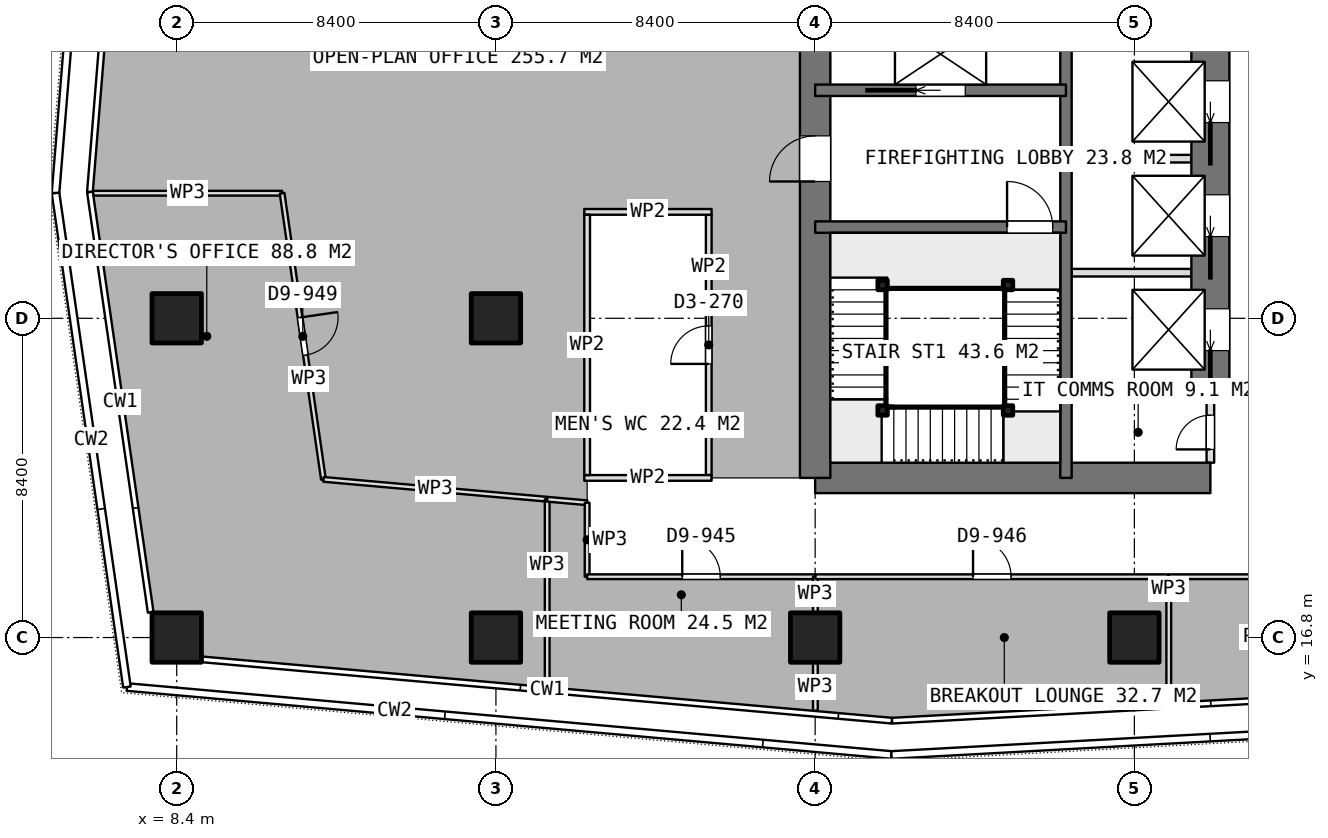
"""IFC4 building model, lengths in metres.
Left out: names, types, materials, properties, quantities, classifications, styles, units other than length and angle.
Written with IfcOpenShell. Run it as: python <this file> out.ifc"""

import sys

from ifc_helpers import new_model, si_unit, direction, frame, frame_2d, origin, origin_2d, place, context, subcontext, project, spatial, rectangle, extrude, element, fill, save


model = new_model("IFC4")
c1 = context("Model", 3, precision=1e-05, world=origin(), true_north=direction((0.0, 1.0)))
c2 = subcontext(c1, "Body", "Model", "MODEL_VIEW")
j1 = project(units=[si_unit("LENGTHUNIT", "METRE"), si_unit("PLANEANGLEUNIT", "RADIAN")], contexts=[c1])
p1 = place(None, origin())
s1 = spatial("IfcSite", under=j1, at=p1, CompositionType="ELEMENT")
p2 = place(p1, origin())
s2 = spatial("IfcBuilding", under=s1, at=p2, CompositionType="ELEMENT")
p3 = place(p2, frame((0.0, 0.0, 253.85)))
s3 = spatial("IfcBuildingStorey", under=s2, at=p3, CompositionType="ELEMENT", Elevation=253.85)
p4 = place(p3, frame((25.2, 21.0, 0.0), z_axis=(0.0, 0.0, 1.0), x_axis=(1.0, 0.0, 0.0)))
e1 = element("IfcWall", 1, at=p4, inside=s3, PredefinedType="SHEAR", context=c2, shape_type="SweptSolid", body=[
    extrude(rectangle(XDim=10.4, YDim=0.8, at=frame_2d((5.2, 0.0))), origin(), (0.0, 0.0, 1.0), 3.75),
])
p5 = place(p3, frame((25.2, 21.0, 0.0), z_axis=(0.0, 0.0, 1.0), x_axis=(0.0, 1.0, 0.0)))
e2 = element("IfcWall", 2, at=p5, inside=s3, PredefinedType="SHEAR", context=c2, shape_type="SweptSolid", body=[
    extrude(rectangle(XDim=25.2, YDim=0.8, at=frame_2d((12.6, 0.0))), origin(), (0.0, 0.0, 1.0), 3.75),
])
p6 = place(p5, frame((7.8, 0.0, 0.0)))
e3 = element("IfcOpeningElement", 3, at=p6, cuts=e2, PredefinedType="OPENING", context=c2, shape_type="SweptSolid", body=[
    extrude(rectangle(XDim=1.2, YDim=2.1, at=frame_2d((0.6, 1.05))), frame((0.0, 0.41, 0.0), z_axis=(0.0, -1.0, 0.0), x_axis=(1.0, 0.0, 0.0)), (0.0, 0.0, 1.0), 0.82),
])
p7 = place(p5, frame((14.25, 0.0, 0.0)))
e4 = element("IfcOpeningElement", 4, at=p7, cuts=e2, PredefinedType="OPENING", context=c2, shape_type="SweptSolid", body=[
    extrude(rectangle(XDim=0.9, YDim=2.1, at=frame_2d((0.45, 1.05))), frame((0.0, 0.41, 0.0), z_axis=(0.0, -1.0, 0.0), x_axis=(1.0, 0.0, 0.0)), (0.0, 0.0, 1.0), 0.82),
])
p8 = place(p5, frame((16.85, 0.0, 0.0)))
e5 = element("IfcOpeningElement", 5, at=p8, cuts=e2, PredefinedType="OPENING", context=c2, shape_type="SweptSolid", body=[
    extrude(rectangle(XDim=0.9, YDim=2.1, at=frame_2d((0.45, 1.05))), frame((0.0, 0.41, 0.0), z_axis=(0.0, -1.0, 0.0), x_axis=(1.0, 0.0, 0.0)), (0.0, 0.0, 1.0), 0.82),
])
p9 = place(p5, frame((18.95, 0.0, 0.0)))
e6 = element("IfcOpeningElement", 6, at=p9, cuts=e2, PredefinedType="OPENING", context=c2, shape_type="SweptSolid", body=[
    extrude(rectangle(XDim=1.2, YDim=2.1, at=frame_2d((0.6, 1.05))), frame((0.0, 0.41, 0.0), z_axis=(0.0, -1.0, 0.0), x_axis=(1.0, 0.0, 0.0)), (0.0, 0.0, 1.0), 0.82),
])
p10 = place(p3, frame((31.8, 21.0, 0.0), z_axis=(0.0, 0.0, 1.0), x_axis=(0.0, 1.0, 0.0)))
e7 = element("IfcWall", 7, at=p10, inside=s3, PredefinedType="SHEAR", context=c2, shape_type="SweptSolid", body=[
    extrude(rectangle(XDim=25.2, YDim=0.3, at=frame_2d((12.6, 0.0))), origin(), (0.0, 0.0, 1.0), 3.75),
])
p11 = place(p3, frame((35.6, 23.4, 0.0), z_axis=(0.0, 0.0, 1.0), x_axis=(0.0, 1.0, 0.0)))
e8 = element("IfcWall", 8, at=p11, inside=s3, PredefinedType="SHEAR", context=c2, shape_type="SweptSolid", body=[
    extrude(rectangle(XDim=18.0, YDim=1.0, at=frame_2d((9.0, 0.0))), origin(), (0.0, 0.0, 1.0), 3.75),
])
p12 = place(p11, frame((0.95, 0.0, 0.0)))
e9 = element("IfcOpeningElement", 9, at=p12, cuts=e8, PredefinedType="OPENING", context=c2, shape_type="SweptSolid", body=[
    extrude(rectangle(XDim=1.1, YDim=2.1, at=frame_2d((0.55, 1.05))), frame((0.0, 0.51, 0.0), z_axis=(0.0, -1.0, 0.0), x_axis=(1.0, 0.0, 0.0)), (0.0, 0.0, 1.0), 1.02),
])
p13 = place(p11, frame((3.95, 0.0, 0.0)))
e10 = element("IfcOpeningElement", 10, at=p13, cuts=e8, PredefinedType="OPENING", context=c2, shape_type="SweptSolid", body=[
    extrude(rectangle(XDim=1.1, YDim=2.1, at=frame_2d((0.55, 1.05))), frame((0.0, 0.51, 0.0), z_axis=(0.0, -1.0, 0.0), x_axis=(1.0, 0.0, 0.0)), (0.0, 0.0, 1.0), 1.02),
])
p14 = place(p11, frame((6.95, 0.0, 0.0)))
e11 = element("IfcOpeningElement", 11, at=p14, cuts=e8, PredefinedType="OPENING", context=c2, shape_type="SweptSolid", body=[
    extrude(rectangle(XDim=1.1, YDim=2.1, at=frame_2d((0.55, 1.05))), frame((0.0, 0.51, 0.0), z_axis=(0.0, -1.0, 0.0), x_axis=(1.0, 0.0, 0.0)), (0.0, 0.0, 1.0), 1.02),
])
p15 = place(p11, frame((9.95, 0.0, 0.0)))
e12 = element("IfcOpeningElement", 12, at=p15, cuts=e8, PredefinedType="OPENING", context=c2, shape_type="SweptSolid", body=[
    extrude(rectangle(XDim=1.1, YDim=2.1, at=frame_2d((0.55, 1.05))), frame((0.0, 0.51, 0.0), z_axis=(0.0, -1.0, 0.0), x_axis=(1.0, 0.0, 0.0)), (0.0, 0.0, 1.0), 1.02),
])
p16 = place(p11, frame((12.95, 0.0, 0.0)))
e13 = element("IfcOpeningElement", 13, at=p16, cuts=e8, PredefinedType="OPENING", context=c2, shape_type="SweptSolid", body=[
    extrude(rectangle(XDim=1.1, YDim=2.1, at=frame_2d((0.55, 1.05))), frame((0.0, 0.51, 0.0), z_axis=(0.0, -1.0, 0.0), x_axis=(1.0, 0.0, 0.0)), (0.0, 0.0, 1.0), 1.02),
])
p17 = place(p11, frame((15.95, 0.0, 0.0)))
e14 = element("IfcOpeningElement", 14, at=p17, cuts=e8, PredefinedType="OPENING", context=c2, shape_type="SweptSolid", body=[
    extrude(rectangle(XDim=1.1, YDim=2.1, at=frame_2d((0.55, 1.05))), frame((0.0, 0.51, 0.0), z_axis=(0.0, -1.0, 0.0), x_axis=(1.0, 0.0, 0.0)), (0.0, 0.0, 1.0), 1.02),
])
p18 = place(p3, frame((31.8, 23.4, 0.0), z_axis=(0.0, 0.0, 1.0), x_axis=(1.0, 0.0, 0.0)))
e15 = element("IfcWall", 15, at=p18, inside=s3, PredefinedType="SHEAR", context=c2, shape_type="SweptSolid", body=[
    extrude(rectangle(XDim=3.8, YDim=0.3, at=frame_2d((1.9, 0.0))), origin(), (0.0, 0.0, 1.0), 3.75),
])
p19 = place(p3, frame((25.2, 27.6, 0.0), z_axis=(0.0, 0.0, 1.0), x_axis=(1.0, 0.0, 0.0)))
e16 = element("IfcWall", 16, at=p19, inside=s3, PredefinedType="SHEAR", context=c2, shape_type="SweptSolid", body=[
    extrude(rectangle(XDim=6.6, YDim=0.3, at=frame_2d((3.3, 0.0))), origin(), (0.0, 0.0, 1.0), 3.75),
])
p20 = place(p19, frame((5.05, 0.0, 0.0)))
e17 = element("IfcOpeningElement", 17, at=p20, cuts=e16, PredefinedType="OPENING", context=c2, shape_type="SweptSolid", body=[
    extrude(rectangle(XDim=1.2, YDim=2.1, at=frame_2d((0.6, 1.05))), frame((0.0, 0.16, 0.0), z_axis=(0.0, -1.0, 0.0), x_axis=(1.0, 0.0, 0.0)), (0.0, 0.0, 1.0), 0.32),
])
p21 = place(p3, frame((25.2, 31.2, 0.0), z_axis=(0.0, 0.0, 1.0), x_axis=(1.0, 0.0, 0.0)))
e18 = element("IfcWall", 18, at=p21, inside=s3, PredefinedType="SHEAR", context=c2, shape_type="SweptSolid", body=[
    extrude(rectangle(XDim=6.6, YDim=0.3, at=frame_2d((3.3, 0.0))), origin(), (0.0, 0.0, 1.0), 3.75),
])
p22 = place(p21, frame((2.65, 0.0, 0.0)))
e19 = element("IfcOpeningElement", 19, at=p22, cuts=e18, PredefinedType="OPENING", context=c2, shape_type="SweptSolid", body=[
    extrude(rectangle(XDim=1.3, YDim=2.1, at=frame_2d((0.65, 1.05))), frame((0.0, 0.16, 0.0), z_axis=(0.0, -1.0, 0.0), x_axis=(1.0, 0.0, 0.0)), (0.0, 0.0, 1.0), 0.32),
])
for number, where, z_axis, x_axis in (
    (20, (8.4, 16.8, 0.0), (0.0, 0.0, 1.0), (1.0, 0.0, 0.0)),
    (21, (8.4, 25.2, 0.0), (0.0, 0.0, 1.0), (1.0, 0.0, 0.0)),
    (22, (16.8, 16.8, 0.0), (0.0, 0.0, 1.0), (1.0, 0.0, 0.0)),
    (23, (16.8, 25.2, 0.0), (0.0, 0.0, 1.0), (1.0, 0.0, 0.0)),
    (24, (25.2, 16.8, 0.0), (0.0, 0.0, 1.0), (1.0, 0.0, 0.0)),
    (25, (33.6, 16.8, 0.0), (0.0, 0.0, 1.0), (1.0, 0.0, 0.0)),
):
    element("IfcColumn", number, at=place(p3, frame(where, z_axis=z_axis, x_axis=x_axis)), inside=s3, PredefinedType="COLUMN", context=c2, shape_type="SweptSolid", body=[
        extrude(rectangle(XDim=1.3, YDim=1.3, at=origin_2d()), origin(), (0.0, 0.0, 1.0), 3.75),
    ])
for number, where, z_axis, x_axis in (
    (26, (31.95, 26.4, 0.0), (0.0, 0.0, 1.0), (1.0, 0.0, 0.0)),
    (27, (31.95, 29.4, 0.0), (0.0, 0.0, 1.0), (1.0, 0.0, 0.0)),
):
    element("IfcWall", number, at=place(p3, frame(where, z_axis=z_axis, x_axis=x_axis)), inside=s3, PredefinedType="PARTITIONING", context=c2, shape_type="SweptSolid", body=[
        extrude(rectangle(XDim=3.15, YDim=0.2, at=frame_2d((1.575, 0.0))), origin(), (0.0, 0.0, 1.0), 3.5),
    ])
p23 = place(p3, frame((35.6, 21.4, 0.0), z_axis=(0.0, 0.0, 1.0), x_axis=(0.0, 1.0, 0.0)))
e28 = element("IfcWall", 28, at=p23, inside=s3, PredefinedType="PARTITIONING", context=c2, shape_type="SweptSolid", body=[
    extrude(rectangle(XDim=1.85, YDim=0.2, at=frame_2d((0.925, 0.0))), origin(), (0.0, 0.0, 1.0), 3.5),
])
p24 = place(p23, frame((0.35, 0.0, 0.0)))
e29 = element("IfcOpeningElement", 29, at=p24, cuts=e28, PredefinedType="OPENING", context=c2, shape_type="SweptSolid", body=[
    extrude(rectangle(XDim=0.9, YDim=2.1, at=frame_2d((0.45, 1.05))), frame((0.0, 0.11, 0.0), z_axis=(0.0, -1.0, 0.0), x_axis=(1.0, 0.0, 0.0)), (0.0, 0.0, 1.0), 0.22),
])
for number, where, z_axis, x_axis in (
    (30, (19.125, 21.0, 0.0), (0.0, 0.0, 1.0), (1.0, 0.0, 0.0)),
    (31, (19.125, 28.0, 0.0), (0.0, 0.0, 1.0), (1.0, 0.0, 0.0)),
):
    element("IfcWall", number, at=place(p3, frame(where, z_axis=z_axis, x_axis=x_axis)), inside=s3, PredefinedType="PARTITIONING", context=c2, shape_type="SweptSolid", body=[
        extrude(rectangle(XDim=3.35, YDim=0.15, at=frame_2d((1.675, 0.0))), origin(), (0.0, 0.0, 1.0), 3.5),
    ])
p25 = place(p3, frame((19.2, 21.075, 0.0), z_axis=(0.0, 0.0, 1.0), x_axis=(0.0, 1.0, 0.0)))
e32 = element("IfcWall", 32, at=p25, inside=s3, PredefinedType="PARTITIONING", context=c2, shape_type="SweptSolid", body=[
    extrude(rectangle(XDim=6.85, YDim=0.15, at=frame_2d((3.425, 0.0))), origin(), (0.0, 0.0, 1.0), 3.5),
])
p26 = place(p3, frame((22.4, 21.075, 0.0), z_axis=(0.0, 0.0, 1.0), x_axis=(0.0, 1.0, 0.0)))
e33 = element("IfcWall", 33, at=p26, inside=s3, PredefinedType="PARTITIONING", context=c2, shape_type="SweptSolid", body=[
    extrude(rectangle(XDim=6.85, YDim=0.15, at=frame_2d((3.425, 0.0))), origin(), (0.0, 0.0, 1.0), 3.5),
])
p27 = place(p26, frame((2.925, 0.0, 0.0)))
e34 = element("IfcOpeningElement", 34, at=p27, cuts=e33, PredefinedType="OPENING", context=c2, shape_type="SweptSolid", body=[
    extrude(rectangle(XDim=1.0, YDim=2.1, at=frame_2d((0.5, 1.05))), frame((0.0, 0.085, 0.0), z_axis=(0.0, -1.0, 0.0), x_axis=(1.0, 0.0, 0.0)), (0.0, 0.0, 1.0), 0.17),
])
p28 = place(p3, frame((34.505, 15.059, 0.0), z_axis=(0.0, 0.0, 1.0), x_axis=(0.0, 1.0, 0.0)))
e35 = element("IfcWall", 35, at=p28, inside=s3, PredefinedType="PARTITIONING", context=c2, shape_type="SweptSolid", body=[
    extrude(rectangle(XDim=3.341, YDim=0.125, at=frame_2d((1.67, 0.0))), origin(), (0.0, 0.0, 1.0), 3.5),
])
p29 = place(p3, frame((34.505, 18.4, 0.0), z_axis=(0.0, 0.0, 1.0), x_axis=(1.0, 0.0, 0.0)))
e36 = element("IfcWall", 36, at=p29, inside=s3, PredefinedType="PARTITIONING", context=c2, shape_type="SweptSolid", body=[
    extrude(rectangle(XDim=8.168, YDim=0.125, at=frame_2d((4.084, 0.0))), origin(), (0.0, 0.0, 1.0), 3.5),
])
p30 = place(p29, frame((3.584, 0.0, 0.0)))
e37 = element("IfcOpeningElement", 37, at=p30, cuts=e36, PredefinedType="OPENING", context=c2, shape_type="SweptSolid", body=[
    extrude(rectangle(XDim=1.0, YDim=2.1, at=frame_2d((0.5, 1.05))), frame((0.0, 0.073, 0.0), z_axis=(0.0, -1.0, 0.0), x_axis=(1.0, 0.0, 0.0)), (0.0, 0.0, 1.0), 0.145),
])
p31 = place(p3, frame((6.201, 28.491, 0.0), z_axis=(0.0, 0.0, 1.0), x_axis=(1.0, 0.0, 0.0)))
e38 = element("IfcWall", 38, at=p31, inside=s3, PredefinedType="PARTITIONING", context=c2, shape_type="SweptSolid", body=[
    extrude(rectangle(XDim=4.972, YDim=0.125, at=frame_2d((2.486, 0.0))), origin(), (0.0, 0.0, 1.0), 3.5),
])
p32 = place(p3, frame((11.173, 28.491, 0.0), z_axis=(0.0, 0.0, 1.0), x_axis=(0.143007219795, -0.989721645255, 0.0)))
e39 = element("IfcWall", 39, at=p32, inside=s3, PredefinedType="PARTITIONING", context=c2, shape_type="SweptSolid", body=[
    extrude(rectangle(XDim=7.607, YDim=0.125, at=frame_2d((3.804, 0.0))), origin(), (0.0, 0.0, 1.0), 3.5),
])
p33 = place(p32, frame((3.304, 0.0, 0.0)))
e40 = element("IfcOpeningElement", 40, at=p33, cuts=e39, PredefinedType="OPENING", context=c2, shape_type="SweptSolid", body=[
    extrude(rectangle(XDim=1.0, YDim=2.1, at=frame_2d((0.5, 1.05))), frame((0.0, 0.073, 0.0), z_axis=(0.0, -1.0, 0.0), x_axis=(1.0, 0.0, 0.0)), (0.0, 0.0, 1.0), 0.145),
])
p34 = place(p3, frame((12.261, 20.962, 0.0), z_axis=(0.0, 0.0, 1.0), x_axis=(0.996078951833, -0.08846876124, 0.0)))
e41 = element("IfcWall", 41, at=p34, inside=s3, PredefinedType="PARTITIONING", context=c2, shape_type="SweptSolid", body=[
    extrude(rectangle(XDim=5.911, YDim=0.125, at=frame_2d((2.956, 0.0))), origin(), (0.0, 0.0, 1.0), 3.5),
])
p35 = place(p3, frame((18.149, 20.439, 0.0), z_axis=(0.0, 0.0, 1.0), x_axis=(0.0, -1.0, 0.0)))
e42 = element("IfcWall", 42, at=p35, inside=s3, PredefinedType="PARTITIONING", context=c2, shape_type="SweptSolid", body=[
    extrude(rectangle(XDim=4.939, YDim=0.125, at=frame_2d((2.469, 0.0))), origin(), (0.0, 0.0, 1.0), 3.5),
])
p36 = place(p3, frame((18.15, 20.439, 0.0), z_axis=(0.0, 0.0, 1.0), x_axis=(0.996099374617, -0.088238517026, 0.0)))
e43 = element("IfcWall", 43, at=p36, inside=s3, PredefinedType="PARTITIONING", context=c2, shape_type="SweptSolid", body=[
    extrude(rectangle(XDim=1.054, YDim=0.125, at=frame_2d((0.527, 0.0))), origin(), (0.0, 0.0, 1.0), 3.5),
])
p37 = place(p3, frame((19.2, 20.346, 0.0), z_axis=(0.0, 0.0, 1.0), x_axis=(0.0, -1.0, 0.0)))
e44 = element("IfcWall", 44, at=p37, inside=s3, PredefinedType="PARTITIONING", context=c2, shape_type="SweptSolid", body=[
    extrude(rectangle(XDim=1.946, YDim=0.125, at=frame_2d((0.973, 0.0))), origin(), (0.0, 0.0, 1.0), 3.5),
])
p38 = place(p3, frame((19.2, 18.4, 0.0), z_axis=(0.0, 0.0, 1.0), x_axis=(1.0, 0.0, 0.0)))
e45 = element("IfcWall", 45, at=p38, inside=s3, PredefinedType="PARTITIONING", context=c2, shape_type="SweptSolid", body=[
    extrude(rectangle(XDim=6.006, YDim=0.125, at=frame_2d((3.003, 0.0))), origin(), (0.0, 0.0, 1.0), 3.5),
])
p39 = place(p38, frame((2.503, 0.0, 0.0)))
e46 = element("IfcOpeningElement", 46, at=p39, cuts=e45, PredefinedType="OPENING", context=c2, shape_type="SweptSolid", body=[
    extrude(rectangle(XDim=1.0, YDim=2.1, at=frame_2d((0.5, 1.05))), frame((0.0, 0.073, 0.0), z_axis=(0.0, -1.0, 0.0), x_axis=(1.0, 0.0, 0.0)), (0.0, 0.0, 1.0), 0.145),
])
p40 = place(p3, frame((25.206, 18.4, 0.0), z_axis=(0.0, 0.0, 1.0), x_axis=(0.0, -1.0, 0.0)))
e47 = element("IfcWall", 47, at=p40, inside=s3, PredefinedType="PARTITIONING", context=c2, shape_type="SweptSolid", body=[
    extrude(rectangle(XDim=0.93, YDim=0.125, at=frame_2d((0.465, 0.0))), origin(), (0.0, 0.0, 1.0), 3.5),
])
p41 = place(p3, frame((25.206, 16.13, 0.0), z_axis=(0.0, 0.0, 1.0), x_axis=(0.0, -1.0, 0.0)))
e48 = element("IfcWall", 48, at=p41, inside=s3, PredefinedType="PARTITIONING", context=c2, shape_type="SweptSolid", body=[
    extrude(rectangle(XDim=1.258, YDim=0.125, at=frame_2d((0.629, 0.0))), origin(), (0.0, 0.0, 1.0), 3.5),
])
p42 = place(p3, frame((25.207, 18.4, 0.0), z_axis=(0.0, 0.0, 1.0), x_axis=(1.0, 0.0, 0.0)))
e49 = element("IfcWall", 49, at=p42, inside=s3, PredefinedType="PARTITIONING", context=c2, shape_type="SweptSolid", body=[
    extrude(rectangle(XDim=9.297, YDim=0.125, at=frame_2d((4.648, 0.0))), origin(), (0.0, 0.0, 1.0), 3.5),
])
p43 = place(p42, frame((4.148, 0.0, 0.0)))
e50 = element("IfcOpeningElement", 50, at=p43, cuts=e49, PredefinedType="OPENING", context=c2, shape_type="SweptSolid", body=[
    extrude(rectangle(XDim=1.0, YDim=2.1, at=frame_2d((0.5, 1.05))), frame((0.0, 0.073, 0.0), z_axis=(0.0, -1.0, 0.0), x_axis=(1.0, 0.0, 0.0)), (0.0, 0.0, 1.0), 0.145),
])
for number, where, z_axis, x_axis in (
    (51, (30.275, 26.075, 0.0), (0.0, 0.0, 1.0), (1.0, 0.0, 0.0)),
    (52, (30.275, 22.775, 0.0), (0.0, 0.0, 1.0), (1.0, 0.0, 0.0)),
    (53, (26.975, 22.775, 0.0), (0.0, 0.0, 1.0), (1.0, 0.0, 0.0)),
    (54, (26.975, 26.075, 0.0), (0.0, 0.0, 1.0), (1.0, 0.0, 0.0)),
):
    element("IfcColumn", number, at=place(p3, frame(where, z_axis=z_axis, x_axis=x_axis)), inside=s3, PredefinedType="COLUMN", context=c2, shape_type="SweptSolid", body=[
        extrude(rectangle(XDim=0.25, YDim=0.25, at=origin_2d()), origin(), (0.0, 0.0, 1.0), 3.75),
    ])
p44 = place(p6, origin())
e55 = element("IfcDoor", 55, at=p44, inside=s3, OperationType="SINGLE_SWING_LEFT", PredefinedType="DOOR", context=c2, shape_type="SweptSolid", body=[
    extrude(rectangle(XDim=1.2, YDim=2.1, at=frame_2d((0.6, 1.05))), frame((0.0, 0.025, 0.0), z_axis=(0.0, -1.0, 0.0), x_axis=(1.0, 0.0, 0.0)), (0.0, 0.0, 1.0), 0.05),
])
fill(e3, e55)
p45 = place(p24, origin())
e56 = element("IfcDoor", 56, at=p45, inside=s3, OperationType="SINGLE_SWING_LEFT", PredefinedType="DOOR", context=c2, shape_type="SweptSolid", body=[
    extrude(rectangle(XDim=0.9, YDim=2.1, at=frame_2d((0.45, 1.05))), frame((0.0, 0.025, 0.0), z_axis=(0.0, -1.0, 0.0), x_axis=(1.0, 0.0, 0.0)), (0.0, 0.0, 1.0), 0.05),
])
fill(e29, e56)
p46 = place(p12, origin())
e57 = element("IfcDoor", 57, at=p46, inside=s3, OperationType="SLIDING_TO_LEFT", PredefinedType="USERDEFINED", context=c2, shape_type="SweptSolid", body=[
    extrude(rectangle(XDim=1.1, YDim=2.1, at=frame_2d((0.55, 1.05))), frame((0.0, 0.025, 0.0), z_axis=(0.0, -1.0, 0.0), x_axis=(1.0, 0.0, 0.0)), (0.0, 0.0, 1.0), 0.05),
])
fill(e9, e57)
p47 = place(p13, origin())
e58 = element("IfcDoor", 58, at=p47, inside=s3, OperationType="SLIDING_TO_LEFT", PredefinedType="USERDEFINED", context=c2, shape_type="SweptSolid", body=[
    extrude(rectangle(XDim=1.1, YDim=2.1, at=frame_2d((0.55, 1.05))), frame((0.0, 0.025, 0.0), z_axis=(0.0, -1.0, 0.0), x_axis=(1.0, 0.0, 0.0)), (0.0, 0.0, 1.0), 0.05),
])
fill(e10, e58)
p48 = place(p14, origin())
e59 = element("IfcDoor", 59, at=p48, inside=s3, OperationType="SLIDING_TO_LEFT", PredefinedType="USERDEFINED", context=c2, shape_type="SweptSolid", body=[
    extrude(rectangle(XDim=1.1, YDim=2.1, at=frame_2d((0.55, 1.05))), frame((0.0, 0.025, 0.0), z_axis=(0.0, -1.0, 0.0), x_axis=(1.0, 0.0, 0.0)), (0.0, 0.0, 1.0), 0.05),
])
fill(e11, e59)
p49 = place(p22, origin())
e60 = element("IfcDoor", 60, at=p49, inside=s3, OperationType="SLIDING_TO_LEFT", PredefinedType="USERDEFINED", context=c2, shape_type="SweptSolid", body=[
    extrude(rectangle(XDim=1.3, YDim=2.1, at=frame_2d((0.65, 1.05))), frame((0.0, 0.025, 0.0), z_axis=(0.0, -1.0, 0.0), x_axis=(1.0, 0.0, 0.0)), (0.0, 0.0, 1.0), 0.05),
])
fill(e19, e60)
p50 = place(p27, origin())
e61 = element("IfcDoor", 61, at=p50, inside=s3, OperationType="SINGLE_SWING_LEFT", PredefinedType="DOOR", context=c2, shape_type="SweptSolid", body=[
    extrude(rectangle(XDim=1.0, YDim=2.1, at=frame_2d((0.5, 1.05))), frame((0.0, 0.025, 0.0), z_axis=(0.0, -1.0, 0.0), x_axis=(1.0, 0.0, 0.0)), (0.0, 0.0, 1.0), 0.05),
])
fill(e34, e61)
p51 = place(p33, origin())
e62 = element("IfcDoor", 62, at=p51, inside=s3, OperationType="SINGLE_SWING_LEFT", PredefinedType="DOOR", context=c2, shape_type="SweptSolid", body=[
    extrude(rectangle(XDim=1.0, YDim=2.1, at=frame_2d((0.5, 1.05))), frame((0.0, 0.025, 0.0), z_axis=(0.0, -1.0, 0.0), x_axis=(1.0, 0.0, 0.0)), (0.0, 0.0, 1.0), 0.05),
])
fill(e40, e62)
p52 = place(p39, origin())
e63 = element("IfcDoor", 63, at=p52, inside=s3, OperationType="SINGLE_SWING_LEFT", PredefinedType="DOOR", context=c2, shape_type="SweptSolid", body=[
    extrude(rectangle(XDim=1.0, YDim=2.1, at=frame_2d((0.5, 1.05))), frame((0.0, 0.025, 0.0), z_axis=(0.0, -1.0, 0.0), x_axis=(1.0, 0.0, 0.0)), (0.0, 0.0, 1.0), 0.05),
])
fill(e46, e63)
p53 = place(p43, origin())
e64 = element("IfcDoor", 64, at=p53, inside=s3, OperationType="SINGLE_SWING_LEFT", PredefinedType="DOOR", context=c2, shape_type="SweptSolid", body=[
    extrude(rectangle(XDim=1.0, YDim=2.1, at=frame_2d((0.5, 1.05))), frame((0.0, 0.025, 0.0), z_axis=(0.0, -1.0, 0.0), x_axis=(1.0, 0.0, 0.0)), (0.0, 0.0, 1.0), 0.05),
])
fill(e50, e64)
p54 = place(p20, origin())
e65 = element("IfcDoor", 65, at=p54, inside=s3, OperationType="SINGLE_SWING_RIGHT", PredefinedType="DOOR", context=c2, shape_type="SweptSolid", body=[
    extrude(rectangle(XDim=1.2, YDim=2.1, at=frame_2d((0.6, 1.05))), frame((0.0, 0.025, 0.0), z_axis=(0.0, -1.0, 0.0), x_axis=(1.0, 0.0, 0.0)), (0.0, 0.0, 1.0), 0.05),
])
fill(e17, e65)
save(model, sys.argv[1])
